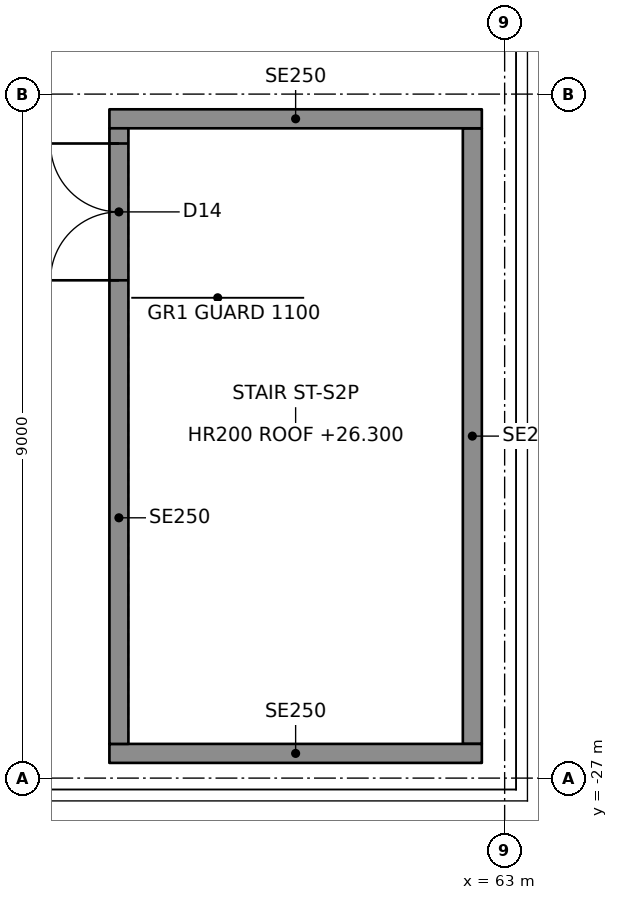
"""IFC4 building model, lengths in metres.
Left out: names, types, materials, properties, quantities, classifications, styles, units other than length and angle.
Written with IfcOpenShell. Run it as: python <this file> out.ifc"""

import sys

from ifc_helpers import new_model, si_unit, direction, frame, frame_2d, origin, place, context, subcontext, project, spatial, rectangle, extrude, element, fill, save


model = new_model("IFC4")
c1 = context("Model", 3, precision=1e-05, world=origin(), true_north=direction((0.0, 1.0)))
c2 = subcontext(c1, "Body", "Model", "MODEL_VIEW")
j1 = project(units=[si_unit("LENGTHUNIT", "METRE"), si_unit("PLANEANGLEUNIT", "RADIAN")], contexts=[c1])
p1 = place(None, origin())
s1 = spatial("IfcSite", under=j1, at=p1, CompositionType="ELEMENT")
p2 = place(p1, origin())
s2 = spatial("IfcBuilding", under=s1, at=p2, CompositionType="ELEMENT")
p3 = place(p2, frame((0.0, 0.0, 23.0)))
s3 = spatial("IfcBuildingStorey", under=s2, at=p3, CompositionType="ELEMENT", Elevation=23.0)
for number, where, z_axis, x_axis in (
    (1, (57.8, -26.675, 0.0), (0.0, 0.0, 1.0), (1.0, 0.0, 0.0)),
    (2, (57.8, -18.325, 0.0), (0.0, 0.0, 1.0), (1.0, 0.0, 0.0)),
):
    element("IfcWall", number, at=place(p3, frame(where, z_axis=z_axis, x_axis=x_axis)), inside=s3, PredefinedType="SOLIDWALL", context=c2, shape_type="SweptSolid", body=[
        extrude(rectangle(XDim=4.9, YDim=0.25, at=frame_2d((2.45, 0.0))), origin(), (0.0, 0.0, 1.0), 3.1),
    ])
p4 = place(p3, frame((57.925, -26.55, 0.0), z_axis=(0.0, 0.0, 1.0), x_axis=(0.0, 1.0, 0.0)))
e3 = element("IfcWall", 3, at=p4, inside=s3, PredefinedType="SOLIDWALL", context=c2, shape_type="SweptSolid", body=[
    extrude(rectangle(XDim=8.1, YDim=0.25, at=frame_2d((4.05, 0.0))), origin(), (0.0, 0.0, 1.0), 3.1),
])
p5 = place(p4, frame((6.1, 0.0, 0.0)))
e4 = element("IfcOpeningElement", 4, at=p5, cuts=e3, PredefinedType="OPENING", context=c2, shape_type="SweptSolid", body=[
    extrude(rectangle(XDim=1.8, YDim=2.1, at=frame_2d((0.9, 1.05))), frame((0.0, 0.135, 0.0), z_axis=(0.0, -1.0, 0.0), x_axis=(1.0, 0.0, 0.0)), (0.0, 0.0, 1.0), 0.27),
])
p6 = place(p3, frame((62.575, -26.55, 0.0), z_axis=(0.0, 0.0, 1.0), x_axis=(0.0, 1.0, 0.0)))
e5 = element("IfcWall", 5, at=p6, inside=s3, PredefinedType="SOLIDWALL", context=c2, shape_type="SweptSolid", body=[
    extrude(rectangle(XDim=8.1, YDim=0.25, at=frame_2d((4.05, 0.0))), origin(), (0.0, 0.0, 1.0), 3.1),
])
p7 = place(p5, origin())
e6 = element("IfcDoor", 6, at=p7, inside=s3, OperationType="DOUBLE_DOOR_SINGLE_SWING", PredefinedType="DOOR", context=c2, shape_type="SweptSolid", body=[
    extrude(rectangle(XDim=1.8, YDim=2.1, at=frame_2d((0.9, 1.05))), frame((0.0, 0.025, 0.0), z_axis=(0.0, -1.0, 0.0), x_axis=(1.0, 0.0, 0.0)), (0.0, 0.0, 1.0), 0.05),
])
fill(e4, e6)
save(model, sys.argv[1])
